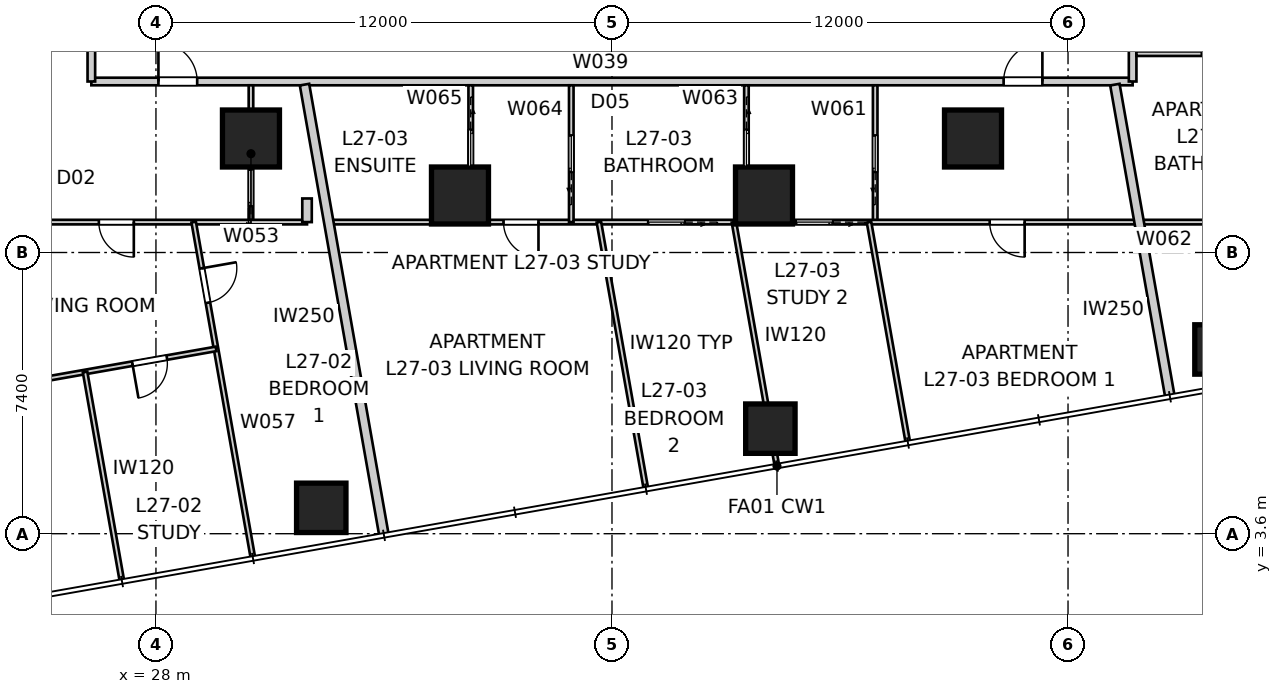
"""IFC4 building model, lengths in metres.
Left out: names, types, materials, properties, quantities, classifications, styles, units other than length and angle.
Written with IfcOpenShell. Run it as: python <this file> out.ifc"""

import sys

from ifc_helpers import new_model, si_unit, direction, frame, frame_2d, origin, origin_2d, place, context, subcontext, project, spatial, rectangle, extrude, element, fill, save


model = new_model("IFC4")
c1 = context("Model", 3, precision=1e-05, world=origin(), true_north=direction((0.0, 1.0)))
c2 = subcontext(c1, "Body", "Model", "MODEL_VIEW")
j1 = project(units=[si_unit("LENGTHUNIT", "METRE"), si_unit("PLANEANGLEUNIT", "RADIAN")], contexts=[c1])
p1 = place(None, origin())
s1 = spatial("IfcSite", under=j1, at=p1, CompositionType="ELEMENT")
p2 = place(p1, origin())
s2 = spatial("IfcBuilding", under=s1, at=p2, CompositionType="ELEMENT")
p3 = place(p2, frame((0.0, 0.0, 99.8)))
s3 = spatial("IfcBuildingStorey", under=s2, at=p3, CompositionType="ELEMENT", Elevation=99.8)
for number, where, z_axis, x_axis in (
    (1, (32.35, 4.281, 0.0), (0.0, 0.0, 1.0), (1.0, 0.0, 0.0)),
    (2, (44.167, 6.365, 0.0), (0.0, 0.0, 1.0), (1.0, 0.0, 0.0)),
    (3, (55.985, 8.448, 0.0), (0.0, 0.0, 1.0), (1.0, 0.0, 0.0)),
):
    element("IfcColumn", number, at=place(p3, frame(where, z_axis=z_axis, x_axis=x_axis)), inside=s3, PredefinedType="COLUMN", context=c2, shape_type="SweptSolid", body=[
        extrude(rectangle(XDim=1.3, YDim=1.3, at=origin_2d()), origin(), (0.0, 0.0, 1.0), 3.4),
    ])
for number, where, z_axis, x_axis in (
    (4, (30.5, 14.0, 0.0), (0.0, 0.0, 1.0), (1.0, 0.0, 0.0)),
    (5, (36.0, 12.5, 0.0), (0.0, 0.0, 1.0), (1.0, 0.0, 0.0)),
    (6, (44.0, 12.5, 0.0), (0.0, 0.0, 1.0), (1.0, 0.0, 0.0)),
    (7, (49.5, 14.0, 0.0), (0.0, 0.0, 1.0), (1.0, 0.0, 0.0)),
):
    element("IfcColumn", number, at=place(p3, frame(where, z_axis=z_axis, x_axis=x_axis)), inside=s3, PredefinedType="COLUMN", context=c2, shape_type="SweptSolid", body=[
        extrude(rectangle(XDim=1.5, YDim=1.5, at=origin_2d()), origin(), (0.0, 0.0, 1.0), 3.4),
    ])
p4 = place(p3, frame((26.3, 15.5, 0.0), z_axis=(0.0, 0.0, 1.0), x_axis=(1.0, 0.0, 0.0)))
e8 = element("IfcWall", 8, at=p4, inside=s3, PredefinedType="PARTITIONING", context=c2, shape_type="SweptSolid", body=[
    extrude(rectangle(XDim=27.4, YDim=0.2, at=frame_2d((13.7, 0.0))), origin(), (0.0, 0.0, 1.0), 3.25),
])
p5 = place(p4, frame((24.005, 0.0, 0.0)))
e9 = element("IfcOpeningElement", 9, at=p5, cuts=e8, PredefinedType="OPENING", context=c2, shape_type="SweptSolid", body=[
    extrude(rectangle(XDim=1.02, YDim=2.1, at=frame_2d((0.51, 1.05))), frame((0.0, 0.11, 0.0), z_axis=(0.0, -1.0, 0.0), x_axis=(1.0, 0.0, 0.0)), (0.0, 0.0, 1.0), 0.22),
])
p6 = place(p4, frame((1.765, 0.0, 0.0)))
e10 = element("IfcOpeningElement", 10, at=p6, cuts=e8, PredefinedType="OPENING", context=c2, shape_type="SweptSolid", body=[
    extrude(rectangle(XDim=1.02, YDim=2.1, at=frame_2d((0.51, 1.05))), frame((0.0, 0.11, 0.0), z_axis=(0.0, -1.0, 0.0), x_axis=(1.0, 0.0, 0.0)), (0.0, 0.0, 1.0), 0.22),
])
p7 = place(p3, frame((53.7, 15.5, 0.0), z_axis=(0.0, 0.0, 1.0), x_axis=(0.0, 1.0, 0.0)))
e11 = element("IfcWall", 11, at=p7, inside=s3, PredefinedType="PARTITIONING", context=c2, shape_type="SweptSolid", body=[
    extrude(rectangle(XDim=29.0, YDim=0.2, at=frame_2d((14.5, 0.0))), origin(), (0.0, 0.0, 1.0), 3.25),
])
p8 = place(p7, frame((24.248, 0.0, 0.0)))
e12 = element("IfcOpeningElement", 12, at=p8, cuts=e11, PredefinedType="OPENING", context=c2, shape_type="SweptSolid", body=[
    extrude(rectangle(XDim=1.02, YDim=2.34, at=frame_2d((0.51, 1.17))), frame((0.0, 0.11, 0.0), z_axis=(0.0, -1.0, 0.0), x_axis=(1.0, 0.0, 0.0)), (0.0, 0.0, 1.0), 0.22),
])
p9 = place(p7, frame((2.976, 0.0, 0.0)))
e13 = element("IfcOpeningElement", 13, at=p9, cuts=e11, PredefinedType="OPENING", context=c2, shape_type="SweptSolid", body=[
    extrude(rectangle(XDim=1.02, YDim=2.1, at=frame_2d((0.51, 1.05))), frame((0.0, 0.11, 0.0), z_axis=(0.0, -1.0, 0.0), x_axis=(1.0, 0.0, 0.0)), (0.0, 0.0, 1.0), 0.22),
])
p10 = place(p7, frame((8.092, 0.0, 0.0)))
e14 = element("IfcOpeningElement", 14, at=p10, cuts=e11, PredefinedType="OPENING", context=c2, shape_type="SweptSolid", body=[
    extrude(rectangle(XDim=1.02, YDim=2.34, at=frame_2d((0.51, 1.17))), frame((0.0, 0.11, 0.0), z_axis=(0.0, -1.0, 0.0), x_axis=(1.0, 0.0, 0.0)), (0.0, 0.0, 1.0), 0.22),
])
p11 = place(p3, frame((26.3, 44.5, 0.0), z_axis=(0.0, 0.0, 1.0), x_axis=(0.0, -1.0, 0.0)))
e15 = element("IfcWall", 15, at=p11, inside=s3, PredefinedType="PARTITIONING", context=c2, shape_type="SweptSolid", body=[
    extrude(rectangle(XDim=29.0, YDim=0.2, at=frame_2d((14.5, 0.0))), origin(), (0.0, 0.0, 1.0), 3.25),
])
p12 = place(p11, frame((14.257, 0.0, 0.0)))
e16 = element("IfcOpeningElement", 16, at=p12, cuts=e15, PredefinedType="OPENING", context=c2, shape_type="SweptSolid", body=[
    extrude(rectangle(XDim=1.02, YDim=2.34, at=frame_2d((0.51, 1.17))), frame((0.0, 0.11, 0.0), z_axis=(0.0, -1.0, 0.0), x_axis=(1.0, 0.0, 0.0)), (0.0, 0.0, 1.0), 0.22),
])
p13 = place(p11, frame((18.322, 0.0, 0.0)))
e17 = element("IfcOpeningElement", 17, at=p13, cuts=e15, PredefinedType="OPENING", context=c2, shape_type="SweptSolid", body=[
    extrude(rectangle(XDim=1.02, YDim=2.34, at=frame_2d((0.51, 1.17))), frame((0.0, 0.11, 0.0), z_axis=(0.0, -1.0, 0.0), x_axis=(1.0, 0.0, 0.0)), (0.0, 0.0, 1.0), 0.22),
])
p14 = place(p11, frame((3.963, 0.0, 0.0)))
e18 = element("IfcOpeningElement", 18, at=p14, cuts=e15, PredefinedType="OPENING", context=c2, shape_type="SweptSolid", body=[
    extrude(rectangle(XDim=1.02, YDim=2.34, at=frame_2d((0.51, 1.17))), frame((0.0, 0.11, 0.0), z_axis=(0.0, -1.0, 0.0), x_axis=(1.0, 0.0, 0.0)), (0.0, 0.0, 1.0), 0.22),
])
p15 = place(p3, frame((34.001, 3.556, 0.0), z_axis=(0.0, 0.0, 1.0), x_axis=(-0.173654664517, 0.984806609184, 0.0)))
e19 = element("IfcWall", 19, at=p15, inside=s3, PredefinedType="PARTITIONING", context=c2, shape_type="SweptSolid", body=[
    extrude(rectangle(XDim=12.044, YDim=0.25, at=frame_2d((6.022, 0.0))), origin(), (0.0, 0.0, 1.0), 3.25),
])
p16 = place(p3, frame((54.682, 7.203, 0.0), z_axis=(0.0, 0.0, 1.0), x_axis=(-0.173651756605, 0.984807121942, 0.0)))
e20 = element("IfcWall", 20, at=p16, inside=s3, PredefinedType="PARTITIONING", context=c2, shape_type="SweptSolid", body=[
    extrude(rectangle(XDim=8.341, YDim=0.25, at=frame_2d((4.171, 0.0))), origin(), (0.0, 0.0, 1.0), 3.25),
])
p17 = place(p3, frame((17.203, 15.318, 0.0), z_axis=(0.0, 0.0, 1.0), x_axis=(0.984810933893, 0.173630137029, 0.0)))
e21 = element("IfcWall", 21, at=p17, inside=s3, PredefinedType="PARTITIONING", context=c2, shape_type="SweptSolid", body=[
    extrude(rectangle(XDim=9.154, YDim=0.25, at=frame_2d((4.577, 0.0))), origin(), (0.0, 0.0, 1.0), 3.25),
])
p18 = place(p3, frame((30.5, 11.8, 0.0), z_axis=(0.0, 0.0, 1.0), x_axis=(0.0, 1.0, 0.0)))
e22 = element("IfcWall", 22, at=p18, inside=s3, PredefinedType="PARTITIONING", context=c2, shape_type="SweptSolid", body=[
    extrude(rectangle(XDim=3.6, YDim=0.12, at=frame_2d((1.8, 0.0))), origin(), (0.0, 0.0, 1.0), 3.25),
])
p19 = place(p18, frame((0.42, 0.0, 0.0)))
e23 = element("IfcOpeningElement", 23, at=p19, cuts=e22, PredefinedType="OPENING", context=c2, shape_type="SweptSolid", body=[
    extrude(rectangle(XDim=0.96, YDim=2.1, at=frame_2d((0.48, 1.05))), frame((0.0, 0.07, 0.0), z_axis=(0.0, -1.0, 0.0), x_axis=(1.0, 0.0, 0.0)), (0.0, 0.0, 1.0), 0.14),
])
p20 = place(p3, frame((31.975, 11.8, 0.0), z_axis=(0.0, 0.0, 1.0), x_axis=(-1.0, 0.0, 0.0)))
e24 = element("IfcWall", 24, at=p20, inside=s3, PredefinedType="PARTITIONING", context=c2, shape_type="SweptSolid", body=[
    extrude(rectangle(XDim=10.175, YDim=0.12, at=frame_2d((5.088, 0.0))), origin(), (0.0, 0.0, 1.0), 3.25),
])
p21 = place(p20, frame((4.558, 0.0, 0.0)))
e25 = element("IfcOpeningElement", 25, at=p21, cuts=e24, PredefinedType="OPENING", context=c2, shape_type="SweptSolid", body=[
    extrude(rectangle(XDim=0.92, YDim=2.34, at=frame_2d((0.46, 1.17))), frame((0.0, 0.07, 0.0), z_axis=(0.0, -1.0, 0.0), x_axis=(1.0, 0.0, 0.0)), (0.0, 0.0, 1.0), 0.14),
])
p22 = place(p3, frame((31.975, 12.422, 0.0), z_axis=(0.0, 0.0, 1.0), x_axis=(0.0, -1.0, 0.0)))
e26 = element("IfcWall", 26, at=p22, inside=s3, PredefinedType="PARTITIONING", context=c2, shape_type="SweptSolid", body=[
    extrude(rectangle(XDim=0.622, YDim=0.25, at=frame_2d((0.311, 0.0))), origin(), (0.0, 0.0, 1.0), 3.25),
])
p23 = place(p3, frame((28.993, 11.8, 0.0), z_axis=(0.0, 0.0, 1.0), x_axis=(0.173639020759, -0.984809367578, 0.0)))
e27 = element("IfcWall", 27, at=p23, inside=s3, PredefinedType="PARTITIONING", context=c2, shape_type="SweptSolid", body=[
    extrude(rectangle(XDim=8.948, YDim=0.12, at=frame_2d((4.474, 0.0))), origin(), (0.0, 0.0, 1.0), 2.638),
])
p24 = place(p23, frame((1.234, 0.0, 0.0)))
e28 = element("IfcOpeningElement", 28, at=p24, cuts=e27, PredefinedType="OPENING", context=c2, shape_type="SweptSolid", body=[
    extrude(rectangle(XDim=0.92, YDim=2.34, at=frame_2d((0.46, 1.17))), frame((0.0, 0.07, 0.0), z_axis=(0.0, -1.0, 0.0), x_axis=(1.0, 0.0, 0.0)), (0.0, 0.0, 1.0), 0.14),
])
p25 = place(p3, frame((29.582, 8.463, 0.0), z_axis=(0.0, 0.0, 1.0), x_axis=(-0.98480552757, -0.173660798302, 0.0)))
e29 = element("IfcWall", 29, at=p25, inside=s3, PredefinedType="PARTITIONING", context=c2, shape_type="SweptSolid", body=[
    extrude(rectangle(XDim=10.96, YDim=0.12, at=frame_2d((5.48, 0.0))), origin(), (0.0, 0.0, 1.0), 3.25),
])
p26 = place(p25, frame((6.765, 0.0, 0.0)))
e30 = element("IfcOpeningElement", 30, at=p26, cuts=e29, PredefinedType="OPENING", context=c2, shape_type="SweptSolid", body=[
    extrude(rectangle(XDim=0.92, YDim=2.34, at=frame_2d((0.46, 1.17))), frame((0.0, 0.07, 0.0), z_axis=(0.0, -1.0, 0.0), x_axis=(1.0, 0.0, 0.0)), (0.0, 0.0, 1.0), 0.14),
])
p27 = place(p25, frame((1.315, 0.0, 0.0)))
e31 = element("IfcOpeningElement", 31, at=p27, cuts=e29, PredefinedType="OPENING", context=c2, shape_type="SweptSolid", body=[
    extrude(rectangle(XDim=0.92, YDim=2.34, at=frame_2d((0.46, 1.17))), frame((0.0, 0.07, 0.0), z_axis=(0.0, -1.0, 0.0), x_axis=(1.0, 0.0, 0.0)), (0.0, 0.0, 1.0), 0.14),
])
p28 = place(p3, frame((26.135, 7.855, 0.0), z_axis=(0.0, 0.0, 1.0), x_axis=(0.173635023028, -0.984810072439, 0.0)))
e32 = element("IfcWall", 32, at=p28, inside=s3, PredefinedType="PARTITIONING", context=c2, shape_type="SweptSolid", body=[
    extrude(rectangle(XDim=5.56, YDim=0.12, at=frame_2d((2.78, 0.0))), origin(), (0.0, 0.0, 1.0), 3.25),
])
p29 = place(p3, frame((46.926, 11.8, 0.0), z_axis=(0.0, 0.0, 1.0), x_axis=(0.0, 1.0, 0.0)))
e33 = element("IfcWall", 33, at=p29, inside=s3, PredefinedType="PARTITIONING", context=c2, shape_type="SweptSolid", body=[
    extrude(rectangle(XDim=3.6, YDim=0.12, at=frame_2d((1.8, 0.0))), origin(), (0.0, 0.0, 1.0), 3.25),
])
p30 = place(p29, frame((1.32, 0.0, 0.0)))
e34 = element("IfcOpeningElement", 34, at=p30, cuts=e33, PredefinedType="OPENING", context=c2, shape_type="SweptSolid", body=[
    extrude(rectangle(XDim=0.96, YDim=2.1, at=frame_2d((0.48, 1.05))), frame((0.0, 0.07, 0.0), z_axis=(0.0, -1.0, 0.0), x_axis=(1.0, 0.0, 0.0)), (0.0, 0.0, 1.0), 0.14),
])
p31 = place(p3, frame((58.2, 11.8, 0.0), z_axis=(0.0, 0.0, 1.0), x_axis=(-1.0, 0.0, 0.0)))
e35 = element("IfcWall", 35, at=p31, inside=s3, PredefinedType="PARTITIONING", context=c2, shape_type="SweptSolid", body=[
    extrude(rectangle(XDim=25.653, YDim=0.12, at=frame_2d((12.826, 0.0))), origin(), (0.0, 0.0, 1.0), 3.25),
])
p32 = place(p31, frame((7.342, 0.0, 0.0)))
e36 = element("IfcOpeningElement", 36, at=p32, cuts=e35, PredefinedType="OPENING", context=c2, shape_type="SweptSolid", body=[
    extrude(rectangle(XDim=0.92, YDim=2.34, at=frame_2d((0.46, 1.17))), frame((0.0, 0.07, 0.0), z_axis=(0.0, -1.0, 0.0), x_axis=(1.0, 0.0, 0.0)), (0.0, 0.0, 1.0), 0.14),
])
p33 = place(p31, frame((12.394, 0.0, 0.0)))
e37 = element("IfcOpeningElement", 37, at=p33, cuts=e35, PredefinedType="OPENING", context=c2, shape_type="SweptSolid", body=[
    extrude(rectangle(XDim=0.96, YDim=2.1, at=frame_2d((0.48, 1.05))), frame((0.0, 0.07, 0.0), z_axis=(0.0, -1.0, 0.0), x_axis=(1.0, 0.0, 0.0)), (0.0, 0.0, 1.0), 0.14),
])
p34 = place(p31, frame((16.288, 0.0, 0.0)))
e38 = element("IfcOpeningElement", 38, at=p34, cuts=e35, PredefinedType="OPENING", context=c2, shape_type="SweptSolid", body=[
    extrude(rectangle(XDim=0.96, YDim=2.1, at=frame_2d((0.48, 1.05))), frame((0.0, 0.07, 0.0), z_axis=(0.0, -1.0, 0.0), x_axis=(1.0, 0.0, 0.0)), (0.0, 0.0, 1.0), 0.14),
])
p35 = place(p31, frame((20.134, 0.0, 0.0)))
e39 = element("IfcOpeningElement", 39, at=p35, cuts=e35, PredefinedType="OPENING", context=c2, shape_type="SweptSolid", body=[
    extrude(rectangle(XDim=0.92, YDim=2.34, at=frame_2d((0.46, 1.17))), frame((0.0, 0.07, 0.0), z_axis=(0.0, -1.0, 0.0), x_axis=(1.0, 0.0, 0.0)), (0.0, 0.0, 1.0), 0.14),
])
p36 = place(p3, frame((43.538, 15.4, 0.0), z_axis=(0.0, 0.0, 1.0), x_axis=(0.0, -1.0, 0.0)))
e40 = element("IfcWall", 40, at=p36, inside=s3, PredefinedType="PARTITIONING", context=c2, shape_type="SweptSolid", body=[
    extrude(rectangle(XDim=3.6, YDim=0.12, at=frame_2d((1.8, 0.0))), origin(), (0.0, 0.0, 1.0), 3.25),
])
p37 = place(p36, frame((1.17, 0.0, 0.0)))
e41 = element("IfcOpeningElement", 41, at=p37, cuts=e40, PredefinedType="OPENING", context=c2, shape_type="SweptSolid", body=[
    extrude(rectangle(XDim=0.96, YDim=2.1, at=frame_2d((0.48, 1.05))), frame((0.0, 0.07, 0.0), z_axis=(0.0, -1.0, 0.0), x_axis=(1.0, 0.0, 0.0)), (0.0, 0.0, 1.0), 0.14),
])
p38 = place(p3, frame((38.929, 11.8, 0.0), z_axis=(0.0, 0.0, 1.0), x_axis=(0.0, 1.0, 0.0)))
e42 = element("IfcWall", 42, at=p38, inside=s3, PredefinedType="PARTITIONING", context=c2, shape_type="SweptSolid", body=[
    extrude(rectangle(XDim=3.6, YDim=0.12, at=frame_2d((1.8, 0.0))), origin(), (0.0, 0.0, 1.0), 3.25),
])
p39 = place(p38, frame((1.32, 0.0, 0.0)))
e43 = element("IfcOpeningElement", 43, at=p39, cuts=e42, PredefinedType="OPENING", context=c2, shape_type="SweptSolid", body=[
    extrude(rectangle(XDim=0.96, YDim=2.1, at=frame_2d((0.48, 1.05))), frame((0.0, 0.07, 0.0), z_axis=(0.0, -1.0, 0.0), x_axis=(1.0, 0.0, 0.0)), (0.0, 0.0, 1.0), 0.14),
])
p40 = place(p3, frame((36.283, 15.4, 0.0), z_axis=(0.0, 0.0, 1.0), x_axis=(0.0, -1.0, 0.0)))
e44 = element("IfcWall", 44, at=p40, inside=s3, PredefinedType="PARTITIONING", context=c2, shape_type="SweptSolid", body=[
    extrude(rectangle(XDim=3.6, YDim=0.12, at=frame_2d((1.8, 0.0))), origin(), (0.0, 0.0, 1.0), 3.25),
])
p41 = place(p40, frame((1.17, 0.0, 0.0)))
e45 = element("IfcOpeningElement", 45, at=p41, cuts=e44, PredefinedType="OPENING", context=c2, shape_type="SweptSolid", body=[
    extrude(rectangle(XDim=0.96, YDim=2.1, at=frame_2d((0.48, 1.05))), frame((0.0, 0.07, 0.0), z_axis=(0.0, -1.0, 0.0), x_axis=(1.0, 0.0, 0.0)), (0.0, 0.0, 1.0), 0.14),
])
p42 = place(p3, frame((39.655, 11.8, 0.0), z_axis=(0.0, 0.0, 1.0), x_axis=(0.17363617165, -0.984809869921, 0.0)))
e46 = element("IfcWall", 46, at=p42, inside=s3, PredefinedType="PARTITIONING", context=c2, shape_type="SweptSolid", body=[
    extrude(rectangle(XDim=7.096, YDim=0.12, at=frame_2d((3.548, 0.0))), origin(), (0.0, 0.0, 1.0), 3.25),
])
p43 = place(p3, frame((47.781, 6.027, 0.0), z_axis=(0.0, 0.0, 1.0), x_axis=(-0.173623777139, 0.984812055172, 0.0)))
e47 = element("IfcWall", 47, at=p43, inside=s3, PredefinedType="PARTITIONING", context=c2, shape_type="SweptSolid", body=[
    extrude(rectangle(XDim=5.862, YDim=0.12, at=frame_2d((2.931, 0.0))), origin(), (0.0, 0.0, 1.0), 3.25),
])
p44 = place(p3, frame((43.209, 11.8, 0.0), z_axis=(0.0, 0.0, 1.0), x_axis=(0.173630564586, -0.984810858511, 0.0)))
e48 = element("IfcWall", 48, at=p44, inside=s3, PredefinedType="PARTITIONING", context=c2, shape_type="SweptSolid", body=[
    extrude(rectangle(XDim=6.479, YDim=0.12, at=frame_2d((3.24, 0.0))), origin(), (0.0, 0.0, 1.0), 3.25),
])
p45 = place(p3, frame((58.2, 16.232, 0.0), z_axis=(0.0, 0.0, 1.0), x_axis=(-1.0, 0.0, 0.0)))
e49 = element("IfcWall", 49, at=p45, inside=s3, PredefinedType="PARTITIONING", context=c2, shape_type="SweptSolid", body=[
    extrude(rectangle(XDim=4.4, YDim=0.12, at=frame_2d((2.2, 0.0))), origin(), (0.0, 0.0, 1.0), 3.25),
])
p46 = place(p45, frame((1.72, 0.0, 0.0)))
e50 = element("IfcOpeningElement", 50, at=p46, cuts=e49, PredefinedType="OPENING", context=c2, shape_type="SweptSolid", body=[
    extrude(rectangle(XDim=0.96, YDim=2.1, at=frame_2d((0.48, 1.05))), frame((0.0, 0.07, 0.0), z_axis=(0.0, -1.0, 0.0), x_axis=(1.0, 0.0, 0.0)), (0.0, 0.0, 1.0), 0.14),
])
p47 = place(p5, origin())
e51 = element("IfcDoor", 51, at=p47, inside=s3, OperationType="SINGLE_SWING_RIGHT", PredefinedType="DOOR", context=c2, shape_type="SweptSolid", body=[
    extrude(rectangle(XDim=1.02, YDim=2.1, at=frame_2d((0.51, 1.05))), frame((0.0, 0.025, 0.0), z_axis=(0.0, -1.0, 0.0), x_axis=(1.0, 0.0, 0.0)), (0.0, 0.0, 1.0), 0.05),
])
fill(e9, e51)
p48 = place(p6, origin())
e52 = element("IfcDoor", 52, at=p48, inside=s3, OperationType="SINGLE_SWING_LEFT", PredefinedType="DOOR", context=c2, shape_type="SweptSolid", body=[
    extrude(rectangle(XDim=1.02, YDim=2.1, at=frame_2d((0.51, 1.05))), frame((0.0, 0.025, 0.0), z_axis=(0.0, -1.0, 0.0), x_axis=(1.0, 0.0, 0.0)), (0.0, 0.0, 1.0), 0.05),
])
fill(e10, e52)
p49 = place(p32, origin())
e53 = element("IfcDoor", 53, at=p49, inside=s3, OperationType="SINGLE_SWING_LEFT", PredefinedType="DOOR", context=c2, shape_type="SweptSolid", body=[
    extrude(rectangle(XDim=0.92, YDim=2.34, at=frame_2d((0.46, 1.17))), frame((0.0, 0.025, 0.0), z_axis=(0.0, -1.0, 0.0), x_axis=(1.0, 0.0, 0.0)), (0.0, 0.0, 1.0), 0.05),
])
fill(e36, e53)
p50 = place(p30, origin())
e54 = element("IfcDoor", 54, at=p50, inside=s3, OperationType="SLIDING_TO_LEFT", PredefinedType="DOOR", context=c2, shape_type="SweptSolid", body=[
    extrude(rectangle(XDim=0.96, YDim=2.1, at=frame_2d((0.48, 1.05))), frame((0.0, 0.025, 0.0), z_axis=(0.0, -1.0, 0.0), x_axis=(1.0, 0.0, 0.0)), (0.0, 0.0, 1.0), 0.05),
])
fill(e34, e54)
p51 = place(p46, origin())
e55 = element("IfcDoor", 55, at=p51, inside=s3, OperationType="SLIDING_TO_LEFT", PredefinedType="DOOR", context=c2, shape_type="SweptSolid", body=[
    extrude(rectangle(XDim=0.96, YDim=2.1, at=frame_2d((0.48, 1.05))), frame((0.0, 0.025, 0.0), z_axis=(0.0, -1.0, 0.0), x_axis=(1.0, 0.0, 0.0)), (0.0, 0.0, 1.0), 0.05),
])
fill(e50, e55)
p52 = place(p21, origin())
e56 = element("IfcDoor", 56, at=p52, inside=s3, OperationType="SINGLE_SWING_LEFT", PredefinedType="DOOR", context=c2, shape_type="SweptSolid", body=[
    extrude(rectangle(XDim=0.92, YDim=2.34, at=frame_2d((0.46, 1.17))), frame((0.0, 0.025, 0.0), z_axis=(0.0, -1.0, 0.0), x_axis=(1.0, 0.0, 0.0)), (0.0, 0.0, 1.0), 0.05),
])
fill(e25, e56)
p53 = place(p19, origin())
e57 = element("IfcDoor", 57, at=p53, inside=s3, OperationType="SLIDING_TO_LEFT", PredefinedType="DOOR", context=c2, shape_type="SweptSolid", body=[
    extrude(rectangle(XDim=0.96, YDim=2.1, at=frame_2d((0.48, 1.05))), frame((0.0, 0.025, 0.0), z_axis=(0.0, -1.0, 0.0), x_axis=(1.0, 0.0, 0.0)), (0.0, 0.0, 1.0), 0.05),
])
fill(e23, e57)
p54 = place(p37, origin())
e58 = element("IfcDoor", 58, at=p54, inside=s3, OperationType="SLIDING_TO_LEFT", PredefinedType="DOOR", context=c2, shape_type="SweptSolid", body=[
    extrude(rectangle(XDim=0.96, YDim=2.1, at=frame_2d((0.48, 1.05))), frame((0.0, 0.025, 0.0), z_axis=(0.0, -1.0, 0.0), x_axis=(1.0, 0.0, 0.0)), (0.0, 0.0, 1.0), 0.05),
])
fill(e41, e58)
p55 = place(p33, origin())
e59 = element("IfcDoor", 59, at=p55, inside=s3, OperationType="SLIDING_TO_LEFT", PredefinedType="DOOR", context=c2, shape_type="SweptSolid", body=[
    extrude(rectangle(XDim=0.96, YDim=2.1, at=frame_2d((0.48, 1.05))), frame((0.0, 0.025, 0.0), z_axis=(0.0, -1.0, 0.0), x_axis=(1.0, 0.0, 0.0)), (0.0, 0.0, 1.0), 0.05),
])
fill(e37, e59)
p56 = place(p27, origin())
e60 = element("IfcDoor", 60, at=p56, inside=s3, OperationType="SINGLE_SWING_RIGHT", PredefinedType="DOOR", context=c2, shape_type="SweptSolid", body=[
    extrude(rectangle(XDim=0.92, YDim=2.34, at=frame_2d((0.46, 1.17))), frame((0.0, 0.025, 0.0), z_axis=(0.0, -1.0, 0.0), x_axis=(1.0, 0.0, 0.0)), (0.0, 0.0, 1.0), 0.05),
])
fill(e31, e60)
p57 = place(p24, origin())
e61 = element("IfcDoor", 61, at=p57, inside=s3, OperationType="SINGLE_SWING_LEFT", PredefinedType="DOOR", context=c2, shape_type="SweptSolid", body=[
    extrude(rectangle(XDim=0.92, YDim=2.34, at=frame_2d((0.46, 1.17))), frame((0.0, 0.025, 0.0), z_axis=(0.0, -1.0, 0.0), x_axis=(1.0, 0.0, 0.0)), (0.0, 0.0, 1.0), 0.05),
])
fill(e28, e61)
p58 = place(p34, origin())
e62 = element("IfcDoor", 62, at=p58, inside=s3, OperationType="SLIDING_TO_LEFT", PredefinedType="DOOR", context=c2, shape_type="SweptSolid", body=[
    extrude(rectangle(XDim=0.96, YDim=2.1, at=frame_2d((0.48, 1.05))), frame((0.0, 0.025, 0.0), z_axis=(0.0, -1.0, 0.0), x_axis=(1.0, 0.0, 0.0)), (0.0, 0.0, 1.0), 0.05),
])
fill(e38, e62)
p59 = place(p39, origin())
e63 = element("IfcDoor", 63, at=p59, inside=s3, OperationType="SLIDING_TO_LEFT", PredefinedType="DOOR", context=c2, shape_type="SweptSolid", body=[
    extrude(rectangle(XDim=0.96, YDim=2.1, at=frame_2d((0.48, 1.05))), frame((0.0, 0.025, 0.0), z_axis=(0.0, -1.0, 0.0), x_axis=(1.0, 0.0, 0.0)), (0.0, 0.0, 1.0), 0.05),
])
fill(e43, e63)
p60 = place(p41, origin())
e64 = element("IfcDoor", 64, at=p60, inside=s3, OperationType="SLIDING_TO_LEFT", PredefinedType="DOOR", context=c2, shape_type="SweptSolid", body=[
    extrude(rectangle(XDim=0.96, YDim=2.1, at=frame_2d((0.48, 1.05))), frame((0.0, 0.025, 0.0), z_axis=(0.0, -1.0, 0.0), x_axis=(1.0, 0.0, 0.0)), (0.0, 0.0, 1.0), 0.05),
])
fill(e45, e64)
p61 = place(p35, origin())
e65 = element("IfcDoor", 65, at=p61, inside=s3, OperationType="SINGLE_SWING_LEFT", PredefinedType="DOOR", context=c2, shape_type="SweptSolid", body=[
    extrude(rectangle(XDim=0.92, YDim=2.34, at=frame_2d((0.46, 1.17))), frame((0.0, 0.025, 0.0), z_axis=(0.0, -1.0, 0.0), x_axis=(1.0, 0.0, 0.0)), (0.0, 0.0, 1.0), 0.05),
])
fill(e39, e65)
save(model, sys.argv[1])
